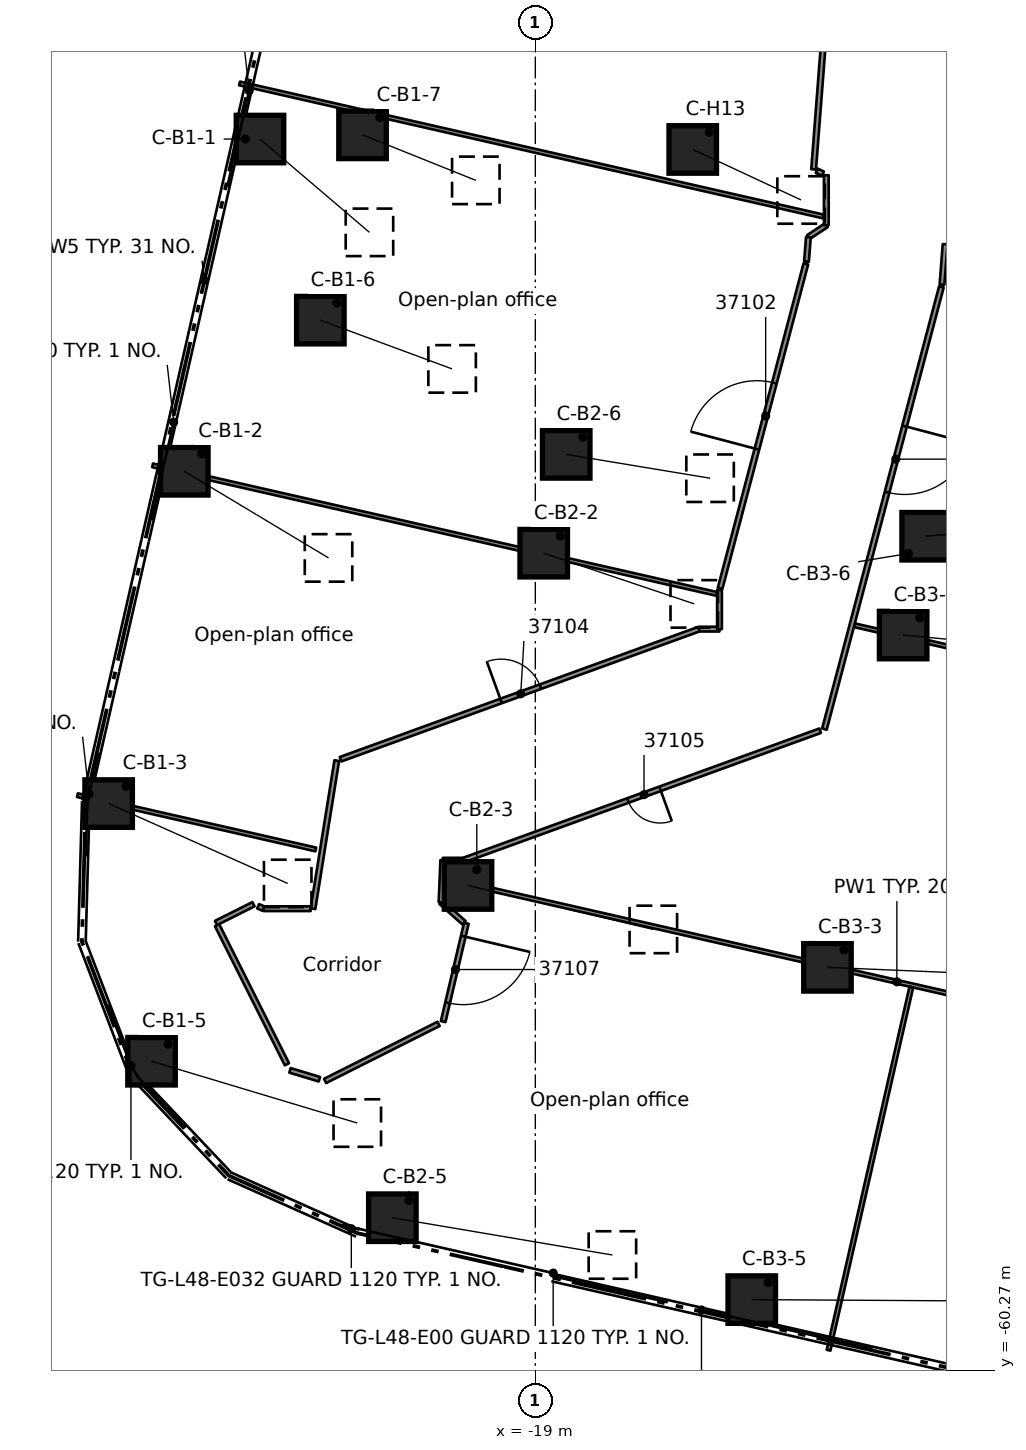
"""IFC4 building model, lengths in metres.
Left out: names, types, materials, properties, quantities, classifications, styles, units other than length and angle.
Written with IfcOpenShell. Run it as: python <this file> out.ifc"""

import sys

from ifc_helpers import new_model, si_unit, direction, frame, frame_2d, origin, origin_2d, place, context, subcontext, project, spatial, rectangle, extrude, element, fill, save


model = new_model("IFC4")
c1 = context("Model", 3, precision=1e-05, world=origin(), true_north=direction((0.0, 1.0)))
c2 = subcontext(c1, "Body", "Model", "MODEL_VIEW")
j1 = project(units=[si_unit("LENGTHUNIT", "METRE"), si_unit("PLANEANGLEUNIT", "RADIAN")], contexts=[c1])
p1 = place(None, origin())
s1 = spatial("IfcSite", under=j1, at=p1, CompositionType="ELEMENT")
p2 = place(p1, origin())
s2 = spatial("IfcBuilding", under=s1, at=p2, CompositionType="ELEMENT")
p3 = place(p2, frame((0.0, 0.0, 184.6)))
s3 = spatial("IfcBuildingStorey", under=s2, at=p3, CompositionType="ELEMENT", Elevation=184.6)
p4 = place(p3, frame((-26.245, -27.867, 0.488), z_axis=(0.594584045488, -0.506835395561, 0.62416960408), x_axis=(0.648717026614, 0.76102970992, 0.0)))
e1 = element("IfcColumn", 1, at=p4, inside=s3, PredefinedType="COLUMN", context=c2, shape_type="SweptSolid", body=[
    extrude(rectangle(XDim=1.25, YDim=1.25, at=origin_2d()), origin(), (0.0, 0.0, 1.0), 4.844),
])
p5 = place(p3, frame((-28.237, -36.609, 0.519), z_axis=(0.712577345737, -0.427913124635, 0.555989104306), x_axis=(0.514820127145, 0.857298219225, 0.0)))
e2 = element("IfcColumn", 2, at=p5, inside=s3, PredefinedType="COLUMN", context=c2, shape_type="SweptSolid", body=[
    extrude(rectangle(XDim=1.25, YDim=1.25, at=origin_2d()), origin(), (0.0, 0.0, 1.0), 5.326),
])
p6 = place(p3, frame((-30.228, -45.352, 0.544), z_axis=(0.795358970602, -0.354820763569, 0.49143293909), x_axis=(0.407411277819, 0.913244792323, 0.0)))
e3 = element("IfcColumn", 3, at=p6, inside=s3, PredefinedType="COLUMN", context=c2, shape_type="SweptSolid", body=[
    extrude(rectangle(XDim=1.25, YDim=1.25, at=origin_2d()), origin(), (0.0, 0.0, 1.0), 5.924),
])
p7 = place(p3, frame((-29.099, -52.132, 0.556), z_axis=(0.852947554724, -0.256161197442, 0.454820744707), x_axis=(0.287633152417, 0.957740658858, 0.0)))
e4 = element("IfcColumn", 4, at=p7, inside=s3, PredefinedType="COLUMN", context=c2, shape_type="SweptSolid", body=[
    extrude(rectangle(XDim=1.25, YDim=1.25, at=origin_2d()), origin(), (0.0, 0.0, 1.0), 6.347),
])
p8 = place(p3, frame((-24.657, -32.632, 0.483), z_axis=(0.724962001082, -0.268268101943, 0.634399182272), x_axis=(0.347045477387, 0.937848301499, 0.0)))
e5 = element("IfcColumn", 5, at=p8, inside=s3, PredefinedType="COLUMN", context=c2, shape_type="SweptSolid", body=[
    extrude(rectangle(XDim=1.25, YDim=1.25, at=origin_2d()), origin(), (0.0, 0.0, 1.0), 4.782),
])
p9 = place(p3, frame((-23.547, -27.757, 0.45), z_axis=(0.667718590405, -0.268104516318, 0.694457955789), x_axis=(0.372608914775, 0.92798846794, 0.0)))
e6 = element("IfcColumn", 6, at=p9, inside=s3, PredefinedType="COLUMN", context=c2, shape_type="SweptSolid", body=[
    extrude(rectangle(XDim=1.25, YDim=1.25, at=origin_2d()), origin(), (0.0, 0.0, 1.0), 4.465),
])
p10 = place(p3, frame((-18.779, -38.764, 0.509), z_axis=(0.771431629349, -0.259806608898, 0.58085606411), x_axis=(0.319170273664, 0.947697386516, 0.0)))
e7 = element("IfcColumn", 7, at=p10, inside=s3, PredefinedType="COLUMN", context=c2, shape_type="SweptSolid", body=[
    extrude(rectangle(XDim=1.25, YDim=1.25, at=origin_2d()), origin(), (0.0, 0.0, 1.0), 5.135),
])
p11 = place(p3, frame((-20.771, -47.507, 0.54), z_axis=(0.840671553318, -0.199476391507, 0.503468478331), x_axis=(0.230871820533, 0.97298417381, 0.0)))
e8 = element("IfcColumn", 8, at=p11, inside=s3, PredefinedType="COLUMN", context=c2, shape_type="SweptSolid", body=[
    extrude(rectangle(XDim=1.25, YDim=1.25, at=origin_2d()), origin(), (0.0, 0.0, 1.0), 5.8),
])
p12 = place(p3, frame((-22.762, -56.249, 0.561), z_axis=(0.885365336717, -0.149999912419, 0.440032097482), x_axis=(0.167041104274, 0.985949932544, 0.0)))
e9 = element("IfcColumn", 9, at=p12, inside=s3, PredefinedType="COLUMN", context=c2, shape_type="SweptSolid", body=[
    extrude(rectangle(XDim=1.25, YDim=1.25, at=origin_2d()), origin(), (0.0, 0.0, 1.0), 6.54),
])
p13 = place(p3, frame((-18.187, -36.164, 0.491), z_axis=(0.775457807337, -0.128450986857, 0.618195384176), x_axis=(0.163418559862, 0.986556827706, 0.0)))
e10 = element("IfcColumn", 10, at=p13, inside=s3, PredefinedType="COLUMN", context=c2, shape_type="SweptSolid", body=[
    extrude(rectangle(XDim=1.25, YDim=1.25, at=origin_2d()), origin(), (0.0, 0.0, 1.0), 4.881),
])
p14 = place(p3, frame((-9.321, -40.918, 0.507), z_axis=(0.807822667818, -0.076366577329, 0.584457597457), x_axis=(0.094114240656, 0.995561404287, 0.0)))
e11 = element("IfcColumn", 11, at=p14, inside=s3, PredefinedType="COLUMN", context=c2, shape_type="SweptSolid", body=[
    extrude(rectangle(XDim=1.25, YDim=1.25, at=origin_2d()), origin(), (0.0, 0.0, 1.0), 5.109),
])
p15 = place(p3, frame((-11.313, -49.661, 0.541), z_axis=(0.864946051901, -0.036562943217, 0.500531196314), x_axis=(0.042234217254, 0.99910773738, 0.0)))
e12 = element("IfcColumn", 12, at=p15, inside=s3, PredefinedType="COLUMN", context=c2, shape_type="SweptSolid", body=[
    extrude(rectangle(XDim=1.25, YDim=1.25, at=origin_2d()), origin(), (0.0, 0.0, 1.0), 5.829),
])
p16 = place(p3, frame((-13.305, -58.404, 0.563), z_axis=(0.900629552041, -0.005425923941, 0.43455375886), x_axis=(0.006024480834, 0.999981852651, 0.0)))
e13 = element("IfcColumn", 13, at=p16, inside=s3, PredefinedType="COLUMN", context=c2, shape_type="SweptSolid", body=[
    extrude(rectangle(XDim=1.25, YDim=1.25, at=origin_2d()), origin(), (0.0, 0.0, 1.0), 6.614),
])
p17 = place(p3, frame((-8.729, -38.318, 0.498), z_axis=(0.794448989588, 0.063769958442, 0.603973671068), x_axis=(-0.080012066347, 0.996793895065, 0.0)))
e14 = element("IfcColumn", 14, at=p17, inside=s3, PredefinedType="COLUMN", context=c2, shape_type="SweptSolid", body=[
    extrude(rectangle(XDim=1.25, YDim=1.25, at=origin_2d()), origin(), (0.0, 0.0, 1.0), 4.973),
])
p18 = place(p3, frame((-14.858, -28.141, 0.444), z_axis=(0.644398349607, -0.300373402151, 0.703225843029), x_axis=(0.422485992548, 0.906369453424, 0.0)))
e15 = element("IfcColumn", 15, at=p18, inside=s3, PredefinedType="COLUMN", context=c2, shape_type="SweptSolid", body=[
    extrude(rectangle(XDim=1.25, YDim=1.25, at=origin_2d()), origin(), (0.0, 0.0, 1.0), 4.424),
])
p19 = place(p3, frame((-27.375, -48.552, 0.0), z_axis=(0.0, 0.0, 1.0), x_axis=(0.448858494017, -0.89360284934, 0.0)))
e16 = element("IfcWall", 16, at=p19, inside=s3, PredefinedType="PARTITIONING", context=c2, shape_type="SweptSolid", body=[
    extrude(rectangle(XDim=4.094, YDim=0.125, at=frame_2d((2.047, 0.0))), origin(), (0.0, 0.0, 1.0), 3.56),
])
p20 = place(p3, frame((-11.594, -28.702, 0.0), z_axis=(0.0, 0.0, 1.0), x_axis=(0.905065675152, -0.425271823264, 0.0)))
e17 = element("IfcWall", 17, at=p20, inside=s3, PredefinedType="PARTITIONING", context=c2, shape_type="SweptSolid", body=[
    extrude(rectangle(XDim=0.179, YDim=0.125, at=frame_2d((0.09, 0.0))), origin(), (0.0, 0.0, 1.0), 3.56),
])
p21 = place(p3, frame((-26.295, -48.054, 0.0), z_axis=(0.0, 0.0, 1.0), x_axis=(0.915946287807, -0.401300881949, 0.0)))
e18 = element("IfcWall", 18, at=p21, inside=s3, PredefinedType="PARTITIONING", context=c2, shape_type="SweptSolid", body=[
    extrude(rectangle(XDim=0.159, YDim=0.125, at=frame_2d((0.08, 0.0))), origin(), (0.0, 0.0, 1.0), 3.56),
])
p22 = place(p3, frame((-25.456, -52.372, 0.0), z_axis=(0.0, 0.0, 1.0), x_axis=(0.957601580573, -0.288095839756, 0.0)))
e19 = element("IfcWall", 19, at=p22, inside=s3, PredefinedType="PARTITIONING", context=c2, shape_type="SweptSolid", body=[
    extrude(rectangle(XDim=0.808, YDim=0.125, at=frame_2d((0.404, 0.0))), origin(), (0.0, 0.0, 1.0), 3.56),
])
p23 = place(p3, frame((-21.481, -47.948, 0.0), z_axis=(0.0, 0.0, 1.0), x_axis=(0.745477690797, -0.666530578837, 0.0)))
e20 = element("IfcWall", 20, at=p23, inside=s3, PredefinedType="PARTITIONING", context=c2, shape_type="SweptSolid", body=[
    extrude(rectangle(XDim=0.81, YDim=0.125, at=frame_2d((0.405, 0.0))), origin(), (0.0, 0.0, 1.0), 3.56),
])
p24 = place(p3, frame((-31.049, -45.131, 0.0), z_axis=(0.0, 0.0, 1.0), x_axis=(0.9750242684, -0.222098347653, 0.0)))
e21 = element("IfcWall", 21, at=p24, inside=s3, PredefinedType="PARTITIONING", context=c2, shape_type="SweptSolid", body=[
    extrude(rectangle(XDim=6.434, YDim=0.1, at=frame_2d((3.217, 0.0))), origin(), (0.0, 0.0, 1.0), 3.56),
])
p25 = place(p3, frame((-21.364, -47.337, 0.0), z_axis=(0.0, 0.0, 1.0), x_axis=(0.975026141861, -0.222090122894, 0.0)))
e22 = element("IfcWall", 22, at=p25, inside=s3, PredefinedType="PARTITIONING", context=c2, shape_type="SweptSolid", body=[
    extrude(rectangle(XDim=24.365, YDim=0.1, at=frame_2d((12.182, 0.0))), origin(), (0.0, 0.0, 1.0), 3.56),
])
p26 = place(p3, frame((-29.073, -36.453, 0.0), z_axis=(0.0, 0.0, 1.0), x_axis=(0.975016001199, -0.222134638017, 0.0)))
e23 = element("IfcWall", 23, at=p26, inside=s3, PredefinedType="PARTITIONING", context=c2, shape_type="SweptSolid", body=[
    extrude(rectangle(XDim=15.225, YDim=0.1, at=frame_2d((7.613, 0.0))), origin(), (0.0, 0.0, 1.0), 3.56),
])
p27 = place(p3, frame((-10.605, -40.66, 0.0), z_axis=(0.0, 0.0, 1.0), x_axis=(0.975014665888, -0.222140499018, 0.0)))
e24 = element("IfcWall", 24, at=p27, inside=s3, PredefinedType="PARTITIONING", context=c2, shape_type="SweptSolid", body=[
    extrude(rectangle(XDim=15.094, YDim=0.1, at=frame_2d((7.547, 0.0))), origin(), (0.0, 0.0, 1.0), 3.56),
])
p28 = place(p3, frame((-26.784, -26.404, 0.0), z_axis=(0.0, 0.0, 1.0), x_axis=(0.975016314544, -0.222133262643, 0.0)))
e25 = element("IfcWall", 25, at=p28, inside=s3, PredefinedType="PARTITIONING", context=c2, shape_type="SweptSolid", body=[
    extrude(rectangle(XDim=15.761, YDim=0.1, at=frame_2d((7.88, 0.0))), origin(), (0.0, 0.0, 1.0), 3.56),
])
p29 = place(p3, frame((-26.149, -48.118, 0.0), z_axis=(0.0, 0.0, 1.0), x_axis=(1.0, 0.0, 0.0)))
e26 = element("IfcWall", 26, at=p29, inside=s3, PredefinedType="PARTITIONING", context=c2, shape_type="SweptSolid", body=[
    extrude(rectangle(XDim=1.236, YDim=0.125, at=frame_2d((0.618, 0.0))), origin(), (0.0, 0.0, 1.0), 3.56),
])
for number, where, z_axis, x_axis in (
    (27, (-21.435, -46.842, 0.0), (0.0, 0.0, 1.0), (1.0, 0.0, 0.0)),
    (28, (-14.697, -40.762, 0.0), (0.0, 0.0, 1.0), (1.0, 0.0, 0.0)),
):
    element("IfcWall", number, at=place(p3, frame(where, z_axis=z_axis, x_axis=x_axis)), inside=s3, PredefinedType="PARTITIONING", context=c2, shape_type="SweptSolid", body=[
        extrude(rectangle(XDim=0.543, YDim=0.125, at=frame_2d((0.271, 0.0))), origin(), (0.0, 0.0, 1.0), 3.56),
    ])
p30 = place(p3, frame((-11.814, -30.447, 0.0), z_axis=(0.0, 0.0, 1.0), x_axis=(0.832846512969, 0.553504007064, 0.0)))
e29 = element("IfcWall", 29, at=p30, inside=s3, PredefinedType="PARTITIONING", context=c2, shape_type="SweptSolid", body=[
    extrude(rectangle(XDim=0.565, YDim=0.125, at=frame_2d((0.283, 0.0))), origin(), (0.0, 0.0, 1.0), 3.56),
])
p31 = place(p3, frame((-11.505, -43.435, 0.0), z_axis=(0.0, 0.0, 1.0), x_axis=(-0.940003814224, -0.341163933095, 0.0)))
e30 = element("IfcWall", 30, at=p31, inside=s3, PredefinedType="PARTITIONING", context=c2, shape_type="SweptSolid", body=[
    extrude(rectangle(XDim=9.986, YDim=0.125, at=frame_2d((4.993, 0.0))), origin(), (0.0, 0.0, 1.0), 3.56),
])
p32 = place(p31, frame((4.48, 0.0, 0.0)))
e31 = element("IfcOpeningElement", 31, at=p32, cuts=e30, PredefinedType="OPENING", context=c2, shape_type="SweptSolid", body=[
    extrude(rectangle(XDim=0.9, YDim=2.1, at=frame_2d((0.45, 1.05))), frame((0.0, 0.073, 0.0), z_axis=(0.0, -1.0, 0.0), x_axis=(1.0, 0.0, 0.0)), (0.0, 0.0, 1.0), 0.145),
])
p33 = place(p3, frame((-24.125, -44.186, 0.0), z_axis=(0.0, 0.0, 1.0), x_axis=(0.939961739334, 0.341279839118, 0.0)))
e32 = element("IfcWall", 32, at=p33, inside=s3, PredefinedType="PARTITIONING", context=c2, shape_type="SweptSolid", body=[
    extrude(rectangle(XDim=10.03, YDim=0.125, at=frame_2d((5.015, 0.0))), origin(), (0.0, 0.0, 1.0), 3.56),
])
p34 = place(p33, frame((4.494, 0.0, 0.0)))
e33 = element("IfcOpeningElement", 33, at=p34, cuts=e32, PredefinedType="OPENING", context=c2, shape_type="SweptSolid", body=[
    extrude(rectangle(XDim=1.1, YDim=2.1, at=frame_2d((0.55, 1.05))), frame((0.0, 0.073, 0.0), z_axis=(0.0, -1.0, 0.0), x_axis=(1.0, 0.0, 0.0)), (0.0, 0.0, 1.0), 0.145),
])
p35 = place(p3, frame((-27.403, -48.495, 0.0), z_axis=(0.0, 0.0, 1.0), x_axis=(0.893851627954, 0.448362874472, 0.0)))
e34 = element("IfcWall", 34, at=p35, inside=s3, PredefinedType="PARTITIONING", context=c2, shape_type="SweptSolid", body=[
    extrude(rectangle(XDim=1.104, YDim=0.125, at=frame_2d((0.552, 0.0))), origin(), (0.0, 0.0, 1.0), 3.56),
])
p36 = place(p3, frame((-24.532, -52.65, 0.0), z_axis=(0.0, 0.0, 1.0), x_axis=(0.89353443756, 0.448994664661, 0.0)))
e35 = element("IfcWall", 35, at=p36, inside=s3, PredefinedType="PARTITIONING", context=c2, shape_type="SweptSolid", body=[
    extrude(rectangle(XDim=3.343, YDim=0.125, at=frame_2d((1.671, 0.0))), origin(), (0.0, 0.0, 1.0), 3.56),
])
p37 = place(p3, frame((-8.315, -31.758, 0.0), z_axis=(0.0, 0.0, 1.0), x_axis=(-0.255738124707, -0.966746094676, 0.0)))
e36 = element("IfcWall", 36, at=p37, inside=s3, PredefinedType="PARTITIONING", context=c2, shape_type="SweptSolid", body=[
    extrude(rectangle(XDim=12.036, YDim=0.125, at=frame_2d((6.018, 0.0))), origin(), (0.0, 0.0, 1.0), 3.56),
])
p38 = place(p37, frame((3.788, 0.0, 0.0)))
e37 = element("IfcOpeningElement", 37, at=p38, cuts=e36, PredefinedType="OPENING", context=c2, shape_type="SweptSolid", body=[
    extrude(rectangle(XDim=1.8, YDim=2.1, at=frame_2d((0.9, 1.05))), frame((0.0, 0.073, 0.0), z_axis=(0.0, -1.0, 0.0), x_axis=(1.0, 0.0, 0.0)), (0.0, 0.0, 1.0), 0.145),
])
p39 = place(p3, frame((-14.137, -39.687, 0.0), z_axis=(0.0, 0.0, 1.0), x_axis=(0.255561854224, 0.966792707185, 0.0)))
e38 = element("IfcWall", 38, at=p39, inside=s3, PredefinedType="PARTITIONING", context=c2, shape_type="SweptSolid", body=[
    extrude(rectangle(XDim=8.827, YDim=0.125, at=frame_2d((4.414, 0.0))), origin(), (0.0, 0.0, 1.0), 3.56),
])
p40 = place(p39, frame((3.788, 0.0, 0.0)))
e39 = element("IfcOpeningElement", 39, at=p40, cuts=e38, PredefinedType="OPENING", context=c2, shape_type="SweptSolid", body=[
    extrude(rectangle(XDim=1.8, YDim=2.1, at=frame_2d((0.9, 1.05))), frame((0.0, 0.073, 0.0), z_axis=(0.0, -1.0, 0.0), x_axis=(1.0, 0.0, 0.0)), (0.0, 0.0, 1.0), 0.145),
])
p41 = place(p3, frame((-20.815, -48.502, 0.0), z_axis=(0.0, 0.0, 1.0), x_axis=(-0.229525642511, -0.973302614519, 0.0)))
e40 = element("IfcWall", 40, at=p41, inside=s3, PredefinedType="PARTITIONING", context=c2, shape_type="SweptSolid", body=[
    extrude(rectangle(XDim=2.658, YDim=0.125, at=frame_2d((1.329, 0.0))), origin(), (0.0, 0.0, 1.0), 3.56),
])
p42 = place(p41, frame((0.35, 0.0, 0.0)))
e41 = element("IfcOpeningElement", 41, at=p42, cuts=e40, PredefinedType="OPENING", context=c2, shape_type="SweptSolid", body=[
    extrude(rectangle(XDim=1.8, YDim=2.1, at=frame_2d((0.9, 1.05))), frame((0.0, 0.073, 0.0), z_axis=(0.0, -1.0, 0.0), x_axis=(1.0, 0.0, 0.0)), (0.0, 0.0, 1.0), 0.145),
])
p43 = place(p3, frame((-21.481, -47.948, 0.0), z_axis=(0.0, 0.0, 1.0), x_axis=(0.041465410314, 0.999139940022, 0.0)))
e42 = element("IfcWall", 42, at=p43, inside=s3, PredefinedType="PARTITIONING", context=c2, shape_type="SweptSolid", body=[
    extrude(rectangle(XDim=1.107, YDim=0.125, at=frame_2d((0.553, 0.0))), origin(), (0.0, 0.0, 1.0), 3.56),
])
p44 = place(p3, frame((-24.225, -44.222, 0.0), z_axis=(0.0, 0.0, 1.0), x_axis=(-0.158637168475, -0.987336947945, 0.0)))
e43 = element("IfcWall", 43, at=p44, inside=s3, PredefinedType="PARTITIONING", context=c2, shape_type="SweptSolid", body=[
    extrude(rectangle(XDim=3.946, YDim=0.125, at=frame_2d((1.973, 0.0))), origin(), (0.0, 0.0, 1.0), 3.56),
])
p45 = place(p3, frame((-11.283, -59.736, 0.0), z_axis=(0.0, 0.0, 1.0), x_axis=(0.222142221774, 0.975014273385, 0.0)))
e44 = element("IfcWall", 44, at=p45, inside=s3, PredefinedType="PARTITIONING", context=c2, shape_type="SweptSolid", body=[
    extrude(rectangle(XDim=9.8, YDim=0.1, at=frame_2d((4.9, 0.0))), origin(), (0.0, 0.0, 1.0), 3.56),
])
p46 = place(p3, frame((-11.865, -31.093, 0.0), z_axis=(0.0, 0.0, 1.0), x_axis=(0.078741898184, 0.996895036336, 0.0)))
e45 = element("IfcWall", 45, at=p46, inside=s3, PredefinedType="PARTITIONING", context=c2, shape_type="SweptSolid", body=[
    extrude(rectangle(XDim=0.648, YDim=0.125, at=frame_2d((0.324, 0.0))), origin(), (0.0, 0.0, 1.0), 3.56),
])
p47 = place(p3, frame((-8.299, -31.697, 0.0), z_axis=(0.0, 0.0, 1.0), x_axis=(0.076941653797, 0.997035597113, 0.0)))
e46 = element("IfcWall", 46, at=p47, inside=s3, PredefinedType="PARTITIONING", context=c2, shape_type="SweptSolid", body=[
    extrude(rectangle(XDim=1.066, YDim=0.125, at=frame_2d((0.533, 0.0))), origin(), (0.0, 0.0, 1.0), 3.56),
])
p48 = place(p3, frame((-11.677, -28.664, 0.0), z_axis=(0.0, 0.0, 1.0), x_axis=(0.077184920093, 0.997016794297, 0.0)))
e47 = element("IfcWall", 47, at=p48, inside=s3, PredefinedType="PARTITIONING", context=c2, shape_type="SweptSolid", body=[
    extrude(rectangle(XDim=12.231, YDim=0.125, at=frame_2d((6.116, 0.0))), origin(), (0.0, 0.0, 1.0), 3.56),
])
p49 = place(p3, frame((-11.343, -30.134, 0.0), z_axis=(0.0, 0.0, 1.0), x_axis=(0.0, 1.0, 0.0)))
e48 = element("IfcWall", 48, at=p49, inside=s3, PredefinedType="PARTITIONING", context=c2, shape_type="SweptSolid", body=[
    extrude(rectangle(XDim=1.314, YDim=0.125, at=frame_2d((0.657, 0.0))), origin(), (0.0, 0.0, 1.0), 3.56),
])
p50 = place(p3, frame((-14.154, -40.762, 0.0), z_axis=(0.0, 0.0, 1.0), x_axis=(0.0, 1.0, 0.0)))
e49 = element("IfcWall", 49, at=p50, inside=s3, PredefinedType="PARTITIONING", context=c2, shape_type="SweptSolid", body=[
    extrude(rectangle(XDim=1.03, YDim=0.125, at=frame_2d((0.515, 0.0))), origin(), (0.0, 0.0, 1.0), 3.56),
])
p51 = place(p40, origin())
e50 = element("IfcDoor", 50, at=p51, inside=s3, OperationType="DOUBLE_DOOR_SINGLE_SWING", PredefinedType="DOOR", context=c2, shape_type="SweptSolid", body=[
    extrude(rectangle(XDim=1.8, YDim=2.1, at=frame_2d((0.9, 1.05))), frame((0.0, 0.025, 0.0), z_axis=(0.0, -1.0, 0.0), x_axis=(1.0, 0.0, 0.0)), (0.0, 0.0, 1.0), 0.05),
])
fill(e39, e50)
p52 = place(p38, origin())
e51 = element("IfcDoor", 51, at=p52, inside=s3, OperationType="DOUBLE_DOOR_SINGLE_SWING", PredefinedType="DOOR", context=c2, shape_type="SweptSolid", body=[
    extrude(rectangle(XDim=1.8, YDim=2.1, at=frame_2d((0.9, 1.05))), frame((0.0, 0.025, 0.0), z_axis=(0.0, -1.0, 0.0), x_axis=(1.0, 0.0, 0.0)), (0.0, 0.0, 1.0), 0.05),
])
fill(e37, e51)
p53 = place(p34, origin())
e52 = element("IfcDoor", 52, at=p53, inside=s3, OperationType="SINGLE_SWING_RIGHT", PredefinedType="DOOR", context=c2, shape_type="SweptSolid", body=[
    extrude(rectangle(XDim=1.1, YDim=2.1, at=frame_2d((0.55, 1.05))), frame((0.0, 0.025, 0.0), z_axis=(0.0, -1.0, 0.0), x_axis=(1.0, 0.0, 0.0)), (0.0, 0.0, 1.0), 0.05),
])
fill(e33, e52)
p54 = place(p32, origin())
e53 = element("IfcDoor", 53, at=p54, inside=s3, OperationType="SINGLE_SWING_LEFT", PredefinedType="DOOR", context=c2, shape_type="SweptSolid", body=[
    extrude(rectangle(XDim=0.9, YDim=2.1, at=frame_2d((0.45, 1.05))), frame((0.0, 0.025, 0.0), z_axis=(0.0, -1.0, 0.0), x_axis=(1.0, 0.0, 0.0)), (0.0, 0.0, 1.0), 0.05),
])
fill(e31, e53)
p55 = place(p42, origin())
e54 = element("IfcDoor", 54, at=p55, inside=s3, OperationType="DOUBLE_DOOR_SINGLE_SWING", PredefinedType="DOOR", context=c2, shape_type="SweptSolid", body=[
    extrude(rectangle(XDim=1.8, YDim=2.1, at=frame_2d((0.9, 1.05))), frame((0.0, 0.025, 0.0), z_axis=(0.0, -1.0, 0.0), x_axis=(1.0, 0.0, 0.0)), (0.0, 0.0, 1.0), 0.05),
])
fill(e41, e54)
save(model, sys.argv[1])
